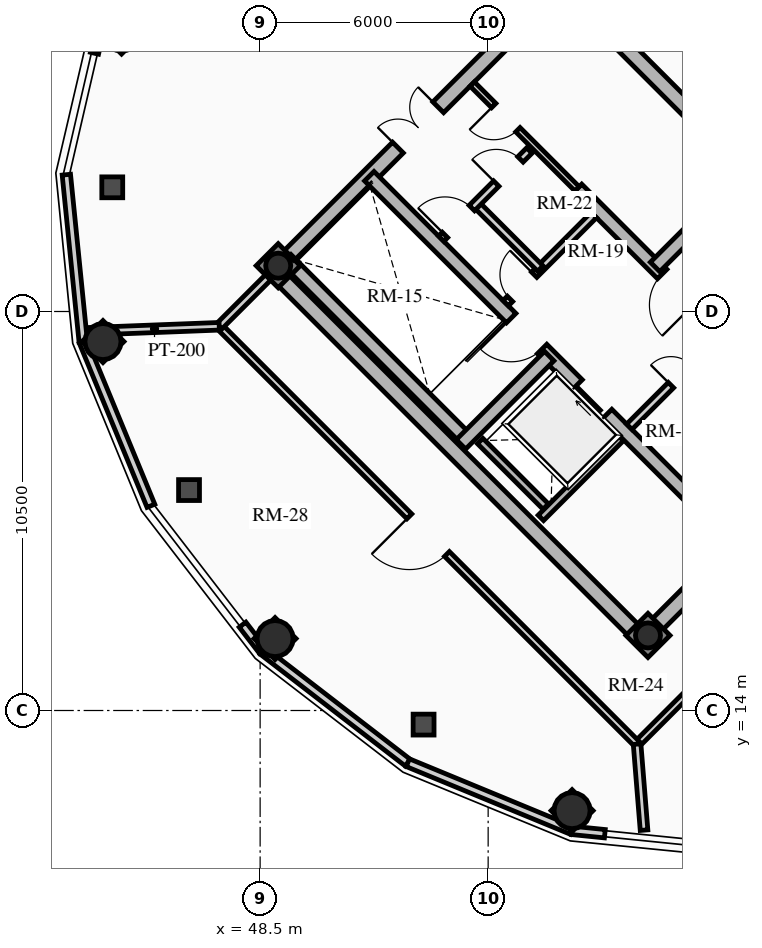
"""IFC4 building model, lengths in metres.
Left out: names, types, materials, properties, quantities, classifications, styles, units other than length and angle.
Written with IfcOpenShell. Run it as: python <this file> out.ifc"""

import sys

from ifc_helpers import new_model, si_unit, direction, frame, frame_2d, origin, origin_2d, place, context, subcontext, project, spatial, rectangle, circle, hollow_circle, extrude, source, transform, mapped, element, fill, save


model = new_model("IFC4")
c1 = context("Model", 3, precision=1e-05, world=origin(), true_north=direction((0.0, 1.0)))
c2 = subcontext(c1, "Body", "Model", "MODEL_VIEW")
j1 = project(units=[si_unit("LENGTHUNIT", "METRE"), si_unit("PLANEANGLEUNIT", "RADIAN")], contexts=[c1])
p1 = place(None, origin())
s1 = spatial("IfcSite", under=j1, at=p1, CompositionType="ELEMENT")
p2 = place(p1, origin())
s2 = spatial("IfcBuilding", under=s1, at=p2, CompositionType="ELEMENT")
p3 = place(p2, frame((0.0, 0.0, 240.33)))
s3 = spatial("IfcBuildingStorey", under=s2, at=p3, CompositionType="ELEMENT", Elevation=240.33)
for number, where, z_axis, x_axis in (
    (1, (58.702, 15.732, 0.0), (0.0, 0.0, 1.0), (-0.707, 0.707, 0.0)),
    (2, (66.268, 23.298, 0.0), (0.0, 0.0, 1.0), (-0.707, 0.707, 0.0)),
):
    element("IfcWall", number, at=place(p3, frame(where, z_axis=z_axis, x_axis=x_axis)), inside=s3, PredefinedType="SHEAR", context=c2, shape_type="SweptSolid", body=[
        extrude(rectangle(XDim=14.1, YDim=0.4, at=frame_2d((7.05, 0.0))), origin(), (0.0, 0.0, 1.0), 4.5),
    ])
p4 = place(p3, frame((58.561, 15.873, 0.0), z_axis=(0.0, 0.0, 1.0), x_axis=(0.707106781187, 0.707106781187, 0.0)))
e3 = element("IfcWall", 3, at=p4, inside=s3, PredefinedType="SHEAR", context=c2, shape_type="SweptSolid", body=[
    extrude(rectangle(XDim=10.7, YDim=0.4, at=frame_2d((5.35, 0.0))), origin(), (0.0, 0.0, 1.0), 4.5),
])
m1 = source(origin(), c2, "Body", "SweptSolid", [
    extrude(rectangle(XDim=1.5, YDim=2.02, at=frame_2d((0.75, 1.01))), frame((0.0, 0.21, 0.0), z_axis=(0.0, -1.0, 0.0), x_axis=(1.0, 0.0, 0.0)), (0.0, 0.0, 1.0), 0.42),
])
p5 = place(p4, frame((5.45, 0.0, 0.0)))
e4 = element("IfcOpeningElement", 4, at=p5, cuts=e3, PredefinedType="OPENING", context=c2, shape_type="MappedRepresentation", body=[
    mapped(m1, transform((0.0, 0.0, 0.0), x_axis=(1.0, 0.0, 0.0), y_axis=(0.0, 1.0, 0.0), z_axis=(0.0, 0.0, 1.0), scale=1.0)),
])
p6 = place(p3, frame((48.873, 25.561, 0.0), z_axis=(0.0, 0.0, 1.0), x_axis=(0.707106781187, 0.707106781187, 0.0)))
e5 = element("IfcWall", 5, at=p6, inside=s3, PredefinedType="SHEAR", context=c2, shape_type="SweptSolid", body=[
    extrude(rectangle(XDim=10.7, YDim=0.4, at=frame_2d((5.35, 0.0))), origin(), (0.0, 0.0, 1.0), 4.5),
])
p7 = place(p6, frame((4.6, 0.0, 0.0)))
e6 = element("IfcOpeningElement", 6, at=p7, cuts=e5, PredefinedType="OPENING", context=c2, shape_type="MappedRepresentation", body=[
    mapped(m1, transform((0.0, 0.0, 0.0), x_axis=(1.0, 0.0, 0.0), y_axis=(0.0, 1.0, 0.0), z_axis=(0.0, 0.0, 1.0), scale=1.0)),
])
p8 = place(p3, frame((61.06, 18.373, 0.0), z_axis=(0.0, 0.0, 1.0), x_axis=(-0.707106781187, 0.707106781187, 0.0)))
e7 = element("IfcWall", 7, at=p8, inside=s3, PredefinedType="SHEAR", context=c2, shape_type="SweptSolid", body=[
    extrude(rectangle(XDim=13.7, YDim=0.35, at=frame_2d((6.85, 0.0))), origin(), (0.0, 0.0, 1.0), 4.5),
])
m2 = source(origin(), c2, "Body", "SweptSolid", [
    extrude(rectangle(XDim=1.1, YDim=2.015, at=frame_2d((0.55, 1.007))), frame((0.0, 0.185, 0.0), z_axis=(0.0, -1.0, 0.0), x_axis=(1.0, 0.0, 0.0)), (0.0, 0.0, 1.0), 0.37),
])
p9 = place(p8, frame((4.85, 0.0, 0.0)))
e8 = element("IfcOpeningElement", 8, at=p9, cuts=e7, PredefinedType="OPENING", context=c2, shape_type="MappedRepresentation", body=[
    mapped(m2, transform((0.0, 0.0, 0.0), x_axis=(1.0, 0.0, 0.0), y_axis=(0.0, 1.0, 0.0), z_axis=(0.0, 0.0, 1.0), scale=1.0)),
])
m3 = source(origin(), c2, "Body", "SweptSolid", [
    extrude(rectangle(XDim=1.15, YDim=2.02, at=frame_2d((0.575, 1.01))), frame((0.0, 0.185, 0.0), z_axis=(0.0, -1.0, 0.0), x_axis=(1.0, 0.0, 0.0)), (0.0, 0.0, 1.0), 0.37),
])
p10 = place(p8, frame((7.27, 0.0, 0.0)))
e9 = element("IfcOpeningElement", 9, at=p10, cuts=e7, PredefinedType="OPENING", context=c2, shape_type="MappedRepresentation", body=[
    mapped(m3, transform((0.0, 0.0, 0.0), x_axis=(1.0, 0.0, 0.0), y_axis=(0.0, 1.0, 0.0), z_axis=(0.0, 0.0, 1.0), scale=1.0)),
])
p11 = place(p3, frame((63.627, 20.94, 0.0), z_axis=(0.0, 0.0, 1.0), x_axis=(-0.707119496762, 0.707094065383, 0.0)))
e10 = element("IfcWall", 10, at=p11, inside=s3, PredefinedType="SHEAR", context=c2, shape_type="SweptSolid", body=[
    extrude(rectangle(XDim=9.6, YDim=0.35, at=frame_2d((4.8, 0.0))), origin(), (0.0, 0.0, 1.0), 4.5),
])
p12 = place(p11, frame((5.28, 0.0, 0.0)))
e11 = element("IfcOpeningElement", 11, at=p12, cuts=e10, PredefinedType="OPENING", context=c2, shape_type="MappedRepresentation", body=[
    mapped(m3, transform((0.0, 0.0, 0.0), x_axis=(1.0, 0.0, 0.0), y_axis=(0.0, 1.0, 0.0), z_axis=(0.0, 0.0, 1.0), scale=1.0)),
])
p13 = place(p3, frame((53.922, 21.141, 0.0), z_axis=(0.0, 0.0, 1.0), x_axis=(-0.707106781187, 0.707106781187, 0.0)))
e12 = element("IfcWall", 12, at=p13, inside=s3, PredefinedType="SHEAR", context=c2, shape_type="SweptSolid", body=[
    extrude(rectangle(XDim=6.695, YDim=0.35, at=frame_2d((3.348, 0.0))), origin(), (0.0, 0.0, 1.0), 4.5),
])
for number, where, z_axis, x_axis in (
    (13, (53.784, 21.003, 0.0), (0.0, 0.0, 1.0), (0.707, 0.707, 0.0)),
    (14, (58.893, 25.674, 0.0), (0.0, 0.0, 1.0), (0.707, 0.707, 0.0)),
):
    element("IfcWall", number, at=place(p3, frame(where, z_axis=z_axis, x_axis=x_axis)), inside=s3, PredefinedType="SHEAR", context=c2, shape_type="SweptSolid", body=[
        extrude(rectangle(XDim=3.285, YDim=0.35, at=frame_2d((1.643, 0.0))), origin(), (0.0, 0.0, 1.0), 4.5),
    ])
for number, where, z_axis, x_axis in (
    (15, (58.706, 15.976, 0.0), (0.0, 0.0, 1.0), (0.707, 0.707, 0.0)),
    (16, (48.976, 25.706, 0.0), (0.0, 0.0, 1.0), (0.707, 0.707, 0.0)),
):
    element("IfcColumn", number, at=place(p3, frame(where, z_axis=z_axis, x_axis=x_axis)), inside=s3, PredefinedType="COLUMN", context=c2, shape_type="SweptSolid", body=[
        extrude(hollow_circle(Radius=0.33, WallThickness=0.025, at=origin_2d()), origin(), (0.0, 0.0, 1.0), 4.5),
    ])
for number, where, z_axis, x_axis in (
    (17, (44.365, 23.709, 0.0), (0.0, 0.0, 1.0), (1.0, 0.0, 0.0)),
    (18, (48.893, 15.893, 0.0), (0.0, 0.0, 1.0), (1.0, 0.0, 0.0)),
    (19, (56.709, 11.365, 0.0), (0.0, 0.0, 1.0), (1.0, 0.0, 0.0)),
):
    element("IfcColumn", number, at=place(p3, frame(where, z_axis=z_axis, x_axis=x_axis)), inside=s3, PredefinedType="COLUMN", context=c2, shape_type="SweptSolid", body=[
        extrude(circle(Radius=0.475, at=origin_2d()), origin(), (0.0, 0.0, 1.0), 4.5),
    ])
p14 = place(p3, frame((44.14, 31.296, 0.0), z_axis=(0.0, 0.0, 1.0), x_axis=(0.22559718249, 0.974220668664, 0.0)))
e20 = element("IfcWall", 20, at=p14, inside=s3, PredefinedType="SOLIDWALL", context=c2, shape_type="SweptSolid", body=[
    extrude(rectangle(XDim=0.87, YDim=0.22, at=frame_2d((0.435, 0.0))), origin(), (0.0, 0.0, 1.0), 3.556),
])
p15 = place(p3, frame((43.845, 23.705, 0.0), z_axis=(0.0, 0.0, 1.0), x_axis=(-0.100570534541, 0.994929930991, 0.0)))
e21 = element("IfcWall", 21, at=p15, inside=s3, PredefinedType="SOLIDWALL", context=c2, shape_type="SweptSolid", body=[
    extrude(rectangle(XDim=4.418, YDim=0.22, at=frame_2d((2.209, 0.0))), origin(), (0.0, 0.0, 1.0), 3.556),
])
p16 = place(p3, frame((45.626, 19.387, 0.0), z_axis=(0.0, 0.0, 1.0), x_axis=(-0.381309704956, 0.924447353237, 0.0)))
e22 = element("IfcWall", 22, at=p16, inside=s3, PredefinedType="SOLIDWALL", context=c2, shape_type="SweptSolid", body=[
    extrude(rectangle(XDim=4.671, YDim=0.22, at=frame_2d((2.335, 0.0))), origin(), (0.0, 0.0, 1.0), 3.556),
])
p17 = place(p3, frame((48.569, 15.569, 0.0), z_axis=(0.0, 0.0, 1.0), x_axis=(-0.610320822734, 0.792154336817, 0.0)))
e23 = element("IfcWall", 23, at=p17, inside=s3, PredefinedType="SOLIDWALL", context=c2, shape_type="SweptSolid", body=[
    extrude(rectangle(XDim=0.87, YDim=0.22, at=frame_2d((0.435, 0.0))), origin(), (0.0, 0.0, 1.0), 3.556),
])
p18 = place(p3, frame((52.387, 12.626, 0.0), z_axis=(0.0, 0.0, 1.0), x_axis=(-0.791998462147, 0.610523083886, 0.0)))
e24 = element("IfcWall", 24, at=p18, inside=s3, PredefinedType="SOLIDWALL", context=c2, shape_type="SweptSolid", body=[
    extrude(rectangle(XDim=4.82, YDim=0.22, at=frame_2d((2.41, 0.0))), origin(), (0.0, 0.0, 1.0), 3.556),
])
p19 = place(p3, frame((56.705, 10.845, 0.0), z_axis=(0.0, 0.0, 1.0), x_axis=(-0.924447353237, 0.381309704956, 0.0)))
e25 = element("IfcWall", 25, at=p19, inside=s3, PredefinedType="SOLIDWALL", context=c2, shape_type="SweptSolid", body=[
    extrude(rectangle(XDim=4.671, YDim=0.22, at=frame_2d((2.335, 0.0))), origin(), (0.0, 0.0, 1.0), 3.556),
])
p20 = place(p3, frame((57.57, 10.758, 0.0), z_axis=(0.0, 0.0, 1.0), x_axis=(-0.994914209363, 0.100725945054, 0.0)))
e26 = element("IfcWall", 26, at=p20, inside=s3, PredefinedType="SOLIDWALL", context=c2, shape_type="SweptSolid", body=[
    extrude(rectangle(XDim=0.87, YDim=0.22, at=frame_2d((0.435, 0.0))), origin(), (0.0, 0.0, 1.0), 3.556),
])
p21 = place(p3, frame((55.888, 19.069, 0.0), z_axis=(0.0, 0.0, 1.0), x_axis=(0.707106781187, 0.707106781187, 0.0)))
e27 = element("IfcWall", 27, at=p21, inside=s3, PredefinedType="SHEAR", context=c2, shape_type="SweptSolid", body=[
    extrude(rectangle(XDim=2.97, YDim=0.2, at=frame_2d((1.485, 0.0))), origin(), (0.0, 0.0, 1.0), 4.5),
])
p22 = place(p3, frame((56.015, 19.366, 0.0), z_axis=(0.0, 0.0, 1.0), x_axis=(-0.707106781187, 0.707106781187, 0.0)))
e28 = element("IfcWall", 28, at=p22, inside=s3, PredefinedType="SHEAR", context=c2, shape_type="SweptSolid", body=[
    extrude(rectangle(XDim=2.44, YDim=0.2, at=frame_2d((1.22, 0.0))), origin(), (0.0, 0.0, 1.0), 4.5),
])
p23 = place(p3, frame((58.214, 21.467, 0.0), z_axis=(0.0, 0.0, 1.0), x_axis=(0.707106781187, 0.707106781187, 0.0)))
e29 = element("IfcWall", 29, at=p23, inside=s3, PredefinedType="PARTITIONING", context=c2, shape_type="SweptSolid", body=[
    extrude(rectangle(XDim=3.28, YDim=0.2, at=frame_2d((1.64, 0.0))), origin(), (0.0, 0.0, 1.0), 4.185),
])
m4 = source(origin(), c2, "Body", "SweptSolid", [
    extrude(rectangle(XDim=1.5, YDim=2.02, at=frame_2d((0.75, 1.01))), frame((0.0, 0.11, 0.0), z_axis=(0.0, -1.0, 0.0), x_axis=(1.0, 0.0, 0.0)), (0.0, 0.0, 1.0), 0.22),
])
p24 = place(p23, frame((1.55, 0.0, 0.0)))
e30 = element("IfcOpeningElement", 30, at=p24, cuts=e29, PredefinedType="OPENING", context=c2, shape_type="MappedRepresentation", body=[
    mapped(m4, transform((0.0, 0.0, 0.0), x_axis=(1.0, 0.0, 0.0), y_axis=(0.0, 1.0, 0.0), z_axis=(0.0, 0.0, 1.0), scale=1.0)),
])
p25 = place(p3, frame((54.961, 24.719, 0.0), z_axis=(0.0, 0.0, 1.0), x_axis=(0.707106781187, 0.707106781187, 0.0)))
e31 = element("IfcWall", 31, at=p25, inside=s3, PredefinedType="PARTITIONING", context=c2, shape_type="SweptSolid", body=[
    extrude(rectangle(XDim=3.28, YDim=0.2, at=frame_2d((1.64, 0.0))), origin(), (0.0, 0.0, 1.0), 4.185),
])
m5 = source(origin(), c2, "Body", "SweptSolid", [
    extrude(rectangle(XDim=0.9, YDim=2.005, at=frame_2d((0.45, 1.002))), frame((0.0, 0.11, 0.0), z_axis=(0.0, -1.0, 0.0), x_axis=(1.0, 0.0, 0.0)), (0.0, 0.0, 1.0), 0.22),
])
p26 = place(p25, frame((0.16, 0.0, 0.0)))
e32 = element("IfcOpeningElement", 32, at=p26, cuts=e31, PredefinedType="OPENING", context=c2, shape_type="MappedRepresentation", body=[
    mapped(m5, transform((0.0, 0.0, 0.0), x_axis=(1.0, 0.0, 0.0), y_axis=(0.0, 1.0, 0.0), z_axis=(0.0, 0.0, 1.0), scale=1.0)),
])
p27 = place(p3, frame((55.874, 25.631, 0.0), z_axis=(0.0, 0.0, 1.0), x_axis=(-0.707157639372, 0.707055919343, 0.0)))
e33 = element("IfcWall", 33, at=p27, inside=s3, PredefinedType="PARTITIONING", context=c2, shape_type="SweptSolid", body=[
    extrude(rectangle(XDim=2.4, YDim=0.2, at=frame_2d((1.2, 0.0))), origin(), (0.0, 0.0, 1.0), 4.185),
])
p28 = place(p3, frame((53.264, 26.416, 0.0), z_axis=(0.0, 0.0, 1.0), x_axis=(0.707106781187, 0.707106781187, 0.0)))
e34 = element("IfcWall", 34, at=p28, inside=s3, PredefinedType="PARTITIONING", context=c2, shape_type="SweptSolid", body=[
    extrude(rectangle(XDim=3.28, YDim=0.2, at=frame_2d((1.64, 0.0))), origin(), (0.0, 0.0, 1.0), 4.185),
])
m6 = source(origin(), c2, "Body", "SweptSolid", [
    extrude(rectangle(XDim=1.0, YDim=2.015, at=frame_2d((0.5, 1.007))), frame((0.0, 0.11, 0.0), z_axis=(0.0, -1.0, 0.0), x_axis=(1.0, 0.0, 0.0)), (0.0, 0.0, 1.0), 0.22),
])
p29 = place(p28, frame((0.14, 0.0, 0.0)))
e35 = element("IfcOpeningElement", 35, at=p29, cuts=e34, PredefinedType="OPENING", context=c2, shape_type="MappedRepresentation", body=[
    mapped(m6, transform((0.0, 0.0, 0.0), x_axis=(1.0, 0.0, 0.0), y_axis=(0.0, 1.0, 0.0), z_axis=(0.0, 0.0, 1.0), scale=1.0)),
])
p30 = place(p28, frame((2.05, 0.0, 0.0)))
e36 = element("IfcOpeningElement", 36, at=p30, cuts=e34, PredefinedType="OPENING", context=c2, shape_type="MappedRepresentation", body=[
    mapped(m5, transform((0.0, 0.0, 0.0), x_axis=(1.0, 0.0, 0.0), y_axis=(0.0, 1.0, 0.0), z_axis=(0.0, 0.0, 1.0), scale=1.0)),
])
p31 = place(p3, frame((56.839, 27.728, 0.0), z_axis=(0.0, 0.0, 1.0), x_axis=(-0.707106781187, 0.707106781187, 0.0)))
e37 = element("IfcWall", 37, at=p31, inside=s3, PredefinedType="PARTITIONING", context=c2, shape_type="SweptSolid", body=[
    extrude(rectangle(XDim=3.9, YDim=0.16, at=frame_2d((1.95, 0.0))), origin(), (0.0, 0.0, 1.0), 4.185),
])
m7 = source(origin(), c2, "Body", "SweptSolid", [
    extrude(rectangle(XDim=0.9, YDim=2.005, at=frame_2d((0.45, 1.002))), frame((0.0, 0.09, 0.0), z_axis=(0.0, -1.0, 0.0), x_axis=(1.0, 0.0, 0.0)), (0.0, 0.0, 1.0), 0.18),
])
p32 = place(p31, frame((2.2, 0.0, 0.0)))
e38 = element("IfcOpeningElement", 38, at=p32, cuts=e37, PredefinedType="OPENING", context=c2, shape_type="MappedRepresentation", body=[
    mapped(m7, transform((0.0, 0.0, 0.0), x_axis=(1.0, 0.0, 0.0), y_axis=(0.0, 1.0, 0.0), z_axis=(0.0, 0.0, 1.0), scale=1.0)),
])
p33 = place(p3, frame((58.419, 13.115, 0.0), z_axis=(0.0, 0.0, 1.0), x_axis=(0.707106781187, 0.707106781187, 0.0)))
e39 = element("IfcWall", 39, at=p33, inside=s3, PredefinedType="PARTITIONING", context=c2, shape_type="SweptSolid", body=[
    extrude(rectangle(XDim=14.8, YDim=0.18, at=frame_2d((7.4, 0.0))), origin(), (0.0, 0.0, 1.0), 3.476),
])
m8 = source(origin(), c2, "Body", "SweptSolid", [
    extrude(rectangle(XDim=1.4, YDim=2.02, at=frame_2d((0.7, 1.01))), frame((0.0, 0.1, 0.0), z_axis=(0.0, -1.0, 0.0), x_axis=(1.0, 0.0, 0.0)), (0.0, 0.0, 1.0), 0.2),
])
p34 = place(p33, frame((6.7, 0.0, 0.0)))
e40 = element("IfcOpeningElement", 40, at=p34, cuts=e39, PredefinedType="OPENING", context=c2, shape_type="MappedRepresentation", body=[
    mapped(m8, transform((0.0, 0.0, 0.0), x_axis=(1.0, 0.0, 0.0), y_axis=(0.0, 1.0, 0.0), z_axis=(0.0, 0.0, 1.0), scale=1.0)),
])
p35 = place(p3, frame((58.419, 13.115, 0.0), z_axis=(0.0, 0.0, 1.0), x_axis=(-0.707106781187, 0.707106781187, 0.0)))
e41 = element("IfcWall", 41, at=p35, inside=s3, PredefinedType="PARTITIONING", context=c2, shape_type="SweptSolid", body=[
    extrude(rectangle(XDim=15.55, YDim=0.18, at=frame_2d((7.775, 0.0))), origin(), (0.0, 0.0, 1.0), 3.476),
])
p36 = place(p35, frame((7.075, 0.0, 0.0)))
e42 = element("IfcOpeningElement", 42, at=p36, cuts=e41, PredefinedType="OPENING", context=c2, shape_type="MappedRepresentation", body=[
    mapped(m8, transform((0.0, 0.0, 0.0), x_axis=(1.0, 0.0, 0.0), y_axis=(0.0, 1.0, 0.0), z_axis=(0.0, 0.0, 1.0), scale=1.0)),
])
p37 = place(p3, frame((68.885, 23.581, 0.0), z_axis=(0.0, 0.0, 1.0), x_axis=(-0.707106781187, 0.707106781187, 0.0)))
e43 = element("IfcWall", 43, at=p37, inside=s3, PredefinedType="PARTITIONING", context=c2, shape_type="SweptSolid", body=[
    extrude(rectangle(XDim=15.55, YDim=0.18, at=frame_2d((7.775, 0.0))), origin(), (0.0, 0.0, 1.0), 3.476),
])
p38 = place(p37, frame((7.075, 0.0, 0.0)))
e44 = element("IfcOpeningElement", 44, at=p38, cuts=e43, PredefinedType="OPENING", context=c2, shape_type="MappedRepresentation", body=[
    mapped(m8, transform((0.0, 0.0, 0.0), x_axis=(1.0, 0.0, 0.0), y_axis=(0.0, 1.0, 0.0), z_axis=(0.0, 0.0, 1.0), scale=1.0)),
])
p39 = place(p3, frame((47.424, 24.111, 0.0), z_axis=(0.0, 0.0, 1.0), x_axis=(0.707172758026, 0.707040798191, 0.0)))
e45 = element("IfcWall", 45, at=p39, inside=s3, PredefinedType="PARTITIONING", context=c2, shape_type="SweptSolid", body=[
    extrude(rectangle(XDim=1.85, YDim=0.2, at=frame_2d((0.925, 0.0))), origin(), (0.0, 0.0, 1.0), 3.476),
])
p40 = place(p3, frame((47.424, 24.111, 0.0), z_axis=(0.0, 0.0, 1.0), x_axis=(-0.999254494259, -0.038606420501, 0.0)))
e46 = element("IfcWall", 46, at=p40, inside=s3, PredefinedType="PARTITIONING", context=c2, shape_type="SweptSolid", body=[
    extrude(rectangle(XDim=3.408, YDim=0.2, at=frame_2d((1.704, 0.0))), origin(), (0.0, 0.0, 1.0), 3.476),
])
p41 = place(p3, frame((58.419, 13.115, 0.0), z_axis=(0.0, 0.0, 1.0), x_axis=(0.080501307187, -0.996754503146, 0.0)))
e47 = element("IfcWall", 47, at=p41, inside=s3, PredefinedType="PARTITIONING", context=c2, shape_type="SweptSolid", body=[
    extrude(rectangle(XDim=2.271, YDim=0.2, at=frame_2d((1.136, 0.0))), origin(), (0.0, 0.0, 1.0), 3.556),
])
m9 = source(origin(), c2, "Body", "SweptSolid", [
    extrude(rectangle(XDim=1.1, YDim=2.015, at=frame_2d((0.55, 1.007))), frame((0.0, 0.025, 0.0), z_axis=(0.0, -1.0, 0.0), x_axis=(1.0, 0.0, 0.0)), (0.0, 0.0, 1.0), 0.05),
])
p42 = place(p9, origin())
e48 = element("IfcDoor", 48, at=p42, inside=s3, OperationType="SLIDING_TO_RIGHT", PredefinedType="DOOR", context=c2, shape_type="MappedRepresentation", body=[
    mapped(m9, transform((0.0, 0.0, 0.0), x_axis=(1.0, 0.0, 0.0), y_axis=(0.0, 1.0, 0.0), z_axis=(0.0, 0.0, 1.0), scale=1.0)),
])
fill(e8, e48)
m10 = source(origin(), c2, "Body", "SweptSolid", [
    extrude(rectangle(XDim=1.15, YDim=2.02, at=frame_2d((0.575, 1.01))), frame((0.0, 0.025, 0.0), z_axis=(0.0, -1.0, 0.0), x_axis=(1.0, 0.0, 0.0)), (0.0, 0.0, 1.0), 0.05),
])
p43 = place(p10, origin())
e49 = element("IfcDoor", 49, at=p43, inside=s3, OperationType="SINGLE_SWING_RIGHT", PredefinedType="DOOR", context=c2, shape_type="MappedRepresentation", body=[
    mapped(m10, transform((0.0, 0.0, 0.0), x_axis=(1.0, 0.0, 0.0), y_axis=(0.0, 1.0, 0.0), z_axis=(0.0, 0.0, 1.0), scale=1.0)),
])
fill(e9, e49)
p44 = place(p12, origin())
e50 = element("IfcDoor", 50, at=p44, inside=s3, OperationType="SINGLE_SWING_LEFT", PredefinedType="DOOR", context=c2, shape_type="MappedRepresentation", body=[
    mapped(m10, transform((0.0, 0.0, 0.0), x_axis=(1.0, 0.0, 0.0), y_axis=(0.0, 1.0, 0.0), z_axis=(0.0, 0.0, 1.0), scale=1.0)),
])
fill(e11, e50)
m11 = source(origin(), c2, "Body", "SweptSolid", [
    extrude(rectangle(XDim=1.5, YDim=2.02, at=frame_2d((0.75, 1.01))), frame((0.0, 0.025, 0.0), z_axis=(0.0, -1.0, 0.0), x_axis=(1.0, 0.0, 0.0)), (0.0, 0.0, 1.0), 0.05),
])
p45 = place(p7, origin())
e51 = element("IfcDoor", 51, at=p45, inside=s3, OperationType="DOUBLE_DOOR_SINGLE_SWING", PredefinedType="DOOR", context=c2, shape_type="MappedRepresentation", body=[
    mapped(m11, transform((0.0, 0.0, 0.0), x_axis=(1.0, 0.0, 0.0), y_axis=(0.0, 1.0, 0.0), z_axis=(0.0, 0.0, 1.0), scale=1.0)),
])
fill(e6, e51)
p46 = place(p24, origin())
e52 = element("IfcDoor", 52, at=p46, inside=s3, OperationType="DOUBLE_DOOR_SINGLE_SWING", PredefinedType="DOOR", context=c2, shape_type="MappedRepresentation", body=[
    mapped(m11, transform((0.0, 0.0, 0.0), x_axis=(1.0, 0.0, 0.0), y_axis=(0.0, 1.0, 0.0), z_axis=(0.0, 0.0, 1.0), scale=1.0)),
])
fill(e30, e52)
m12 = source(origin(), c2, "Body", "SweptSolid", [
    extrude(rectangle(XDim=0.9, YDim=2.005, at=frame_2d((0.45, 1.002))), frame((0.0, 0.025, 0.0), z_axis=(0.0, -1.0, 0.0), x_axis=(1.0, 0.0, 0.0)), (0.0, 0.0, 1.0), 0.05),
])
p47 = place(p26, origin())
e53 = element("IfcDoor", 53, at=p47, inside=s3, OperationType="SINGLE_SWING_RIGHT", PredefinedType="DOOR", context=c2, shape_type="MappedRepresentation", body=[
    mapped(m12, transform((0.0, 0.0, 0.0), x_axis=(1.0, 0.0, 0.0), y_axis=(0.0, 1.0, 0.0), z_axis=(0.0, 0.0, 1.0), scale=1.0)),
])
fill(e32, e53)
m13 = source(origin(), c2, "Body", "SweptSolid", [
    extrude(rectangle(XDim=1.0, YDim=2.015, at=frame_2d((0.5, 1.007))), frame((0.0, 0.025, 0.0), z_axis=(0.0, -1.0, 0.0), x_axis=(1.0, 0.0, 0.0)), (0.0, 0.0, 1.0), 0.05),
])
p48 = place(p29, origin())
e54 = element("IfcDoor", 54, at=p48, inside=s3, OperationType="SINGLE_SWING_LEFT", PredefinedType="DOOR", context=c2, shape_type="MappedRepresentation", body=[
    mapped(m13, transform((0.0, 0.0, 0.0), x_axis=(1.0, 0.0, 0.0), y_axis=(0.0, 1.0, 0.0), z_axis=(0.0, 0.0, 1.0), scale=1.0)),
])
fill(e35, e54)
p49 = place(p30, origin())
e55 = element("IfcDoor", 55, at=p49, inside=s3, OperationType="SINGLE_SWING_LEFT", PredefinedType="DOOR", context=c2, shape_type="MappedRepresentation", body=[
    mapped(m12, transform((0.0, 0.0, 0.0), x_axis=(1.0, 0.0, 0.0), y_axis=(0.0, 1.0, 0.0), z_axis=(0.0, 0.0, 1.0), scale=1.0)),
])
fill(e36, e55)
p50 = place(p32, origin())
e56 = element("IfcDoor", 56, at=p50, inside=s3, OperationType="SINGLE_SWING_RIGHT", PredefinedType="DOOR", context=c2, shape_type="MappedRepresentation", body=[
    mapped(m12, transform((0.0, 0.0, 0.0), x_axis=(1.0, 0.0, 0.0), y_axis=(0.0, 1.0, 0.0), z_axis=(0.0, 0.0, 1.0), scale=1.0)),
])
fill(e38, e56)
m14 = source(origin(), c2, "Body", "SweptSolid", [
    extrude(rectangle(XDim=1.4, YDim=2.02, at=frame_2d((0.7, 1.01))), frame((0.0, 0.025, 0.0), z_axis=(0.0, -1.0, 0.0), x_axis=(1.0, 0.0, 0.0)), (0.0, 0.0, 1.0), 0.05),
])
p51 = place(p36, origin())
e57 = element("IfcDoor", 57, at=p51, inside=s3, OperationType="SINGLE_SWING_RIGHT", PredefinedType="DOOR", context=c2, shape_type="MappedRepresentation", body=[
    mapped(m14, transform((0.0, 0.0, 0.0), x_axis=(1.0, 0.0, 0.0), y_axis=(0.0, 1.0, 0.0), z_axis=(0.0, 0.0, 1.0), scale=1.0)),
])
fill(e42, e57)
save(model, sys.argv[1])
